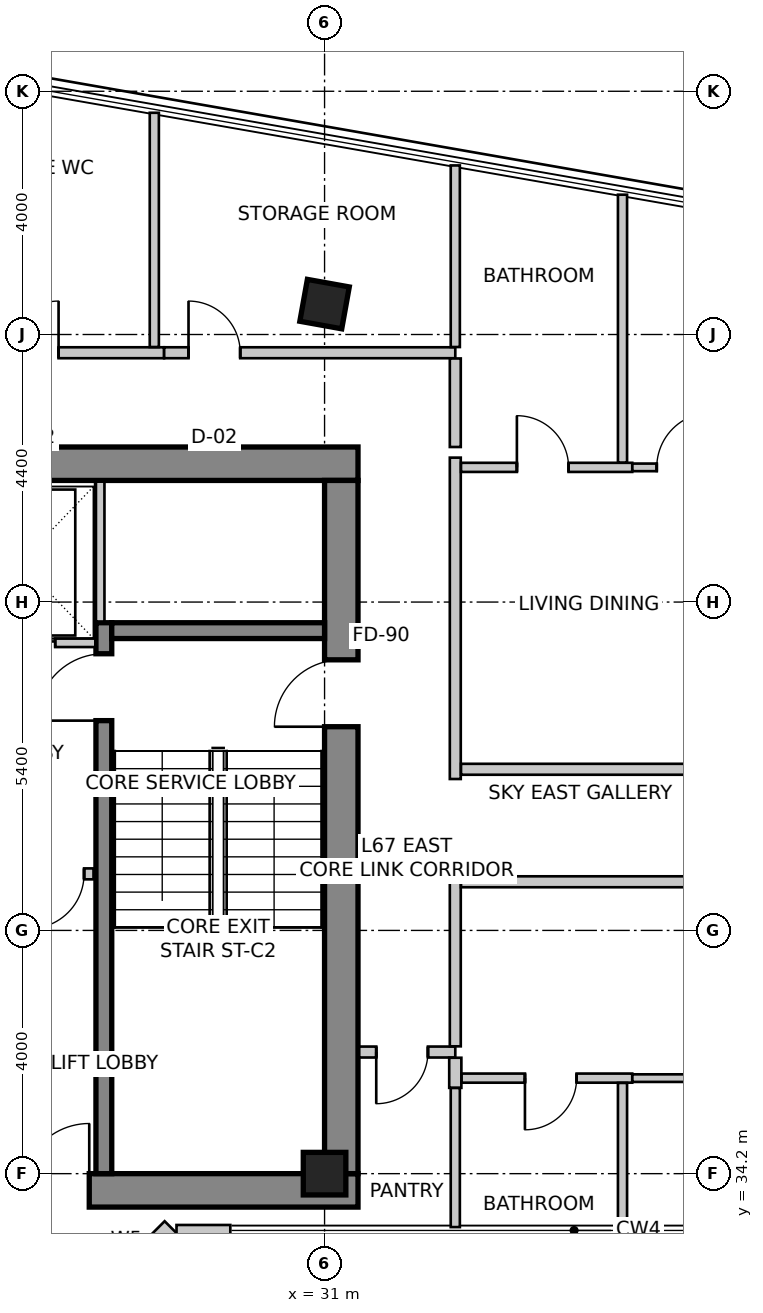
"""IFC4 building model, lengths in metres.
Left out: names, types, materials, properties, quantities, classifications, styles, units other than length and angle.
Written with IfcOpenShell. Run it as: python <this file> out.ifc"""

import sys

from ifc_helpers import new_model, si_unit, direction, frame, frame_2d, origin, origin_2d, place, context, subcontext, project, spatial, rectangle, extrude, source, transform, mapped, element, fill, save


model = new_model("IFC4")
c1 = context("Model", 3, precision=1e-05, world=origin(), true_north=direction((0.0, 1.0)))
c2 = subcontext(c1, "Body", "Model", "MODEL_VIEW")
j1 = project(units=[si_unit("LENGTHUNIT", "METRE"), si_unit("PLANEANGLEUNIT", "RADIAN")], contexts=[c1])
p1 = place(None, origin())
s1 = spatial("IfcSite", under=j1, at=p1, CompositionType="ELEMENT")
p2 = place(p1, origin())
s2 = spatial("IfcBuilding", under=s1, at=p2, CompositionType="ELEMENT")
p3 = place(p2, frame((0.0, 0.0, 263.7)))
s3 = spatial("IfcBuildingStorey", under=s2, at=p3, CompositionType="ELEMENT", Elevation=263.7)
p4 = place(p3, frame((16.05, 45.875, 0.0), z_axis=(0.0, 0.0, 1.0), x_axis=(1.0, 0.0, 0.0)))
e1 = element("IfcWall", 1, at=p4, inside=s3, PredefinedType="SHEAR", context=c2, shape_type="SweptSolid", body=[
    extrude(rectangle(XDim=15.5, YDim=0.55, at=frame_2d((7.75, 0.0))), origin(), (0.0, 0.0, 1.0), 3.6),
])
p5 = place(p3, frame((16.05, 33.925, 0.0), z_axis=(0.0, 0.0, 1.0), x_axis=(1.0, 0.0, 0.0)))
e2 = element("IfcWall", 2, at=p5, inside=s3, PredefinedType="SHEAR", context=c2, shape_type="SweptSolid", body=[
    extrude(rectangle(XDim=15.5, YDim=0.55, at=frame_2d((7.75, 0.0))), origin(), (0.0, 0.0, 1.0), 3.6),
])
m1 = source(origin(), c2, "Body", "SweptSolid", [
    extrude(rectangle(XDim=1.1, YDim=2.15, at=frame_2d((0.55, 1.075))), frame((0.0, 0.285, 0.0), z_axis=(0.0, -1.0, 0.0), x_axis=(1.0, 0.0, 0.0)), (0.0, 0.0, 1.0), 0.57),
])
p6 = place(p5, frame((9.98, 0.0, 0.0)))
e3 = element("IfcOpeningElement", 3, at=p6, cuts=e2, PredefinedType="OPENING", context=c2, shape_type="MappedRepresentation", body=[
    mapped(m1, transform((0.0, 0.0, 0.0), scale=1.0)),
])
p7 = place(p3, frame((31.275, 34.2, 0.0), z_axis=(0.0, 0.0, 1.0), x_axis=(0.0, 1.0, 0.0)))
e4 = element("IfcWall", 4, at=p7, inside=s3, PredefinedType="SHEAR", context=c2, shape_type="SweptSolid", body=[
    extrude(rectangle(XDim=11.4, YDim=0.55, at=frame_2d((5.7, 0.0))), origin(), (0.0, 0.0, 1.0), 3.6),
])
p8 = place(p7, frame((7.35, 0.0, 0.0)))
e5 = element("IfcOpeningElement", 5, at=p8, cuts=e4, PredefinedType="OPENING", context=c2, shape_type="MappedRepresentation", body=[
    mapped(m1, transform((0.0, 0.0, 0.0), scale=1.0)),
])
p9 = place(p3, frame((27.37, 34.2, 0.0), z_axis=(0.0, 0.0, 1.0), x_axis=(0.0, 1.0, 0.0)))
e6 = element("IfcWall", 6, at=p9, inside=s3, PredefinedType="SHEAR", context=c2, shape_type="SweptSolid", body=[
    extrude(rectangle(XDim=9.06, YDim=0.26, at=frame_2d((4.53, 0.0))), origin(), (0.0, 0.0, 1.0), 3.6),
])
m2 = source(origin(), c2, "Body", "SweptSolid", [
    extrude(rectangle(XDim=1.1, YDim=2.15, at=frame_2d((0.55, 1.075))), frame((0.0, 0.14, 0.0), z_axis=(0.0, -1.0, 0.0), x_axis=(1.0, 0.0, 0.0)), (0.0, 0.0, 1.0), 0.28),
])
p10 = place(p9, frame((7.45, 0.0, 0.0)))
e7 = element("IfcOpeningElement", 7, at=p10, cuts=e6, PredefinedType="OPENING", context=c2, shape_type="MappedRepresentation", body=[
    mapped(m2, transform((0.0, 0.0, 0.0), scale=1.0)),
])
p11 = place(p3, frame((27.5, 43.13, 0.0), z_axis=(0.0, 0.0, 1.0), x_axis=(1.0, 0.0, 0.0)))
e8 = element("IfcWall", 8, at=p11, inside=s3, PredefinedType="SHEAR", context=c2, shape_type="SweptSolid", body=[
    extrude(rectangle(XDim=3.5, YDim=0.26, at=frame_2d((1.75, 0.0))), origin(), (0.0, 0.0, 1.0), 3.6),
])
m3 = source(origin(), c2, "Body", "SweptSolid", [
    extrude(rectangle(XDim=0.7, YDim=0.7, at=origin_2d()), origin(), (0.0, 0.0, 1.0), 3.6),
])
for number, where, z_axis, x_axis in (
    (9, (31.0, 48.5, 0.0), (0.0, 0.0, 1.0), (0.984, -0.177, 0.0)),
    (10, (31.0, 34.2, 0.0), (0.0, 0.0, 1.0), (1.0, 0.0, 0.0)),
):
    element("IfcColumn", number, at=place(p3, frame(where, z_axis=z_axis, x_axis=x_axis)), inside=s3, PredefinedType="COLUMN", context=c2, shape_type="MappedRepresentation", body=[
        mapped(m3, transform((0.0, 0.0, 0.0), scale=1.0)),
    ])
p12 = place(p3, frame((26.42, 31.256, 0.0), z_axis=(0.0, 0.0, 1.0), x_axis=(0.707106781187, 0.707106781187, 0.0)))
e11 = element("IfcWall", 11, at=p12, inside=s3, PredefinedType="SOLIDWALL", context=c2, shape_type="SweptSolid", body=[
    extrude(rectangle(XDim=2.907, YDim=0.3, at=frame_2d((1.454, 0.0))), origin(), (0.0, 0.0, 1.0), 3.35),
])
m4 = source(origin(), c2, "Body", "SweptSolid", [
    extrude(rectangle(XDim=1.2, YDim=1.6, at=frame_2d((0.6, 0.8))), frame((0.0, 0.16, 0.0), z_axis=(0.0, -1.0, 0.0), x_axis=(1.0, 0.0, 0.0)), (0.0, 0.0, 1.0), 0.32),
])
p13 = place(p12, frame((1.272, 0.0, 0.85)))
e12 = element("IfcOpeningElement", 12, at=p13, cuts=e11, PredefinedType="OPENING", context=c2, shape_type="MappedRepresentation", body=[
    mapped(m4, transform((0.0, 0.0, 0.0), scale=1.0)),
])
p14 = place(p3, frame((28.565, 33.206, 0.0), z_axis=(0.0, 0.0, 1.0), x_axis=(1.0, 0.0, 0.0)))
e13 = element("IfcWall", 13, at=p14, inside=s3, PredefinedType="SOLIDWALL", context=c2, shape_type="SweptSolid", body=[
    extrude(rectangle(XDim=0.885, YDim=0.3, at=frame_2d((0.442, 0.0))), origin(), (0.0, 0.0, 1.0), 3.35),
])
p15 = place(p3, frame((20.37, 42.93, 0.0), z_axis=(0.0, 0.0, 1.0), x_axis=(1.0, 0.0, 0.0)))
e14 = element("IfcWall", 14, at=p15, inside=s3, PredefinedType="SOLIDWALL", context=c2, shape_type="SweptSolid", body=[
    extrude(rectangle(XDim=6.86, YDim=0.14, at=frame_2d((3.43, 0.0))), origin(), (0.0, 0.0, 1.0), 3.35),
])
m5 = source(origin(), c2, "Body", "SweptSolid", [
    extrude(rectangle(XDim=1.1, YDim=2.15, at=frame_2d((0.55, 1.075))), frame((0.0, 0.08, 0.0), z_axis=(0.0, -1.0, 0.0), x_axis=(1.0, 0.0, 0.0)), (0.0, 0.0, 1.0), 0.16),
])
p16 = place(p15, frame((0.5, 0.0, 0.0)))
e15 = element("IfcOpeningElement", 15, at=p16, cuts=e14, PredefinedType="OPENING", context=c2, shape_type="MappedRepresentation", body=[
    mapped(m5, transform((0.0, 0.0, 0.0), scale=1.0)),
])
p17 = place(p15, frame((2.7, 0.0, 0.0)))
e16 = element("IfcOpeningElement", 16, at=p17, cuts=e14, PredefinedType="OPENING", context=c2, shape_type="MappedRepresentation", body=[
    mapped(m5, transform((0.0, 0.0, 0.0), scale=1.0)),
])
p18 = place(p15, frame((5.1, 0.0, 0.0)))
e17 = element("IfcOpeningElement", 17, at=p18, cuts=e14, PredefinedType="OPENING", context=c2, shape_type="MappedRepresentation", body=[
    mapped(m5, transform((0.0, 0.0, 0.0), scale=1.0)),
])
p19 = place(p3, frame((27.31, 43.28, 0.0), z_axis=(0.0, 0.0, 1.0), x_axis=(0.0, 1.0, 0.0)))
e18 = element("IfcWall", 18, at=p19, inside=s3, PredefinedType="SOLIDWALL", context=c2, shape_type="SweptSolid", body=[
    extrude(rectangle(XDim=2.3, YDim=0.14, at=frame_2d((1.15, 0.0))), origin(), (0.0, 0.0, 1.0), 3.35),
])
p20 = place(p3, frame((27.2, 39.13, 0.0), z_axis=(0.0, 0.0, 1.0), x_axis=(-1.0, 0.0, 0.0)))
e19 = element("IfcWall", 19, at=p20, inside=s3, PredefinedType="PARTITIONING", context=c2, shape_type="SweptSolid", body=[
    extrude(rectangle(XDim=1.21, YDim=0.18, at=frame_2d((0.605, 0.0))), origin(), (0.0, 0.0, 1.0), 3.35),
])
m6 = source(origin(), c2, "Body", "SweptSolid", [
    extrude(rectangle(XDim=0.9, YDim=2.15, at=frame_2d((0.45, 1.075))), frame((0.0, 0.1, 0.0), z_axis=(0.0, -1.0, 0.0), x_axis=(1.0, 0.0, 0.0)), (0.0, 0.0, 1.0), 0.2),
])
p21 = place(p20, frame((0.155, 0.0, 0.0)))
e20 = element("IfcOpeningElement", 20, at=p21, cuts=e19, PredefinedType="OPENING", context=c2, shape_type="MappedRepresentation", body=[
    mapped(m6, transform((0.0, 0.0, 0.0), scale=1.0)),
])
p22 = place(p3, frame((24.162, 47.7, 0.0), z_axis=(0.0, 0.0, 1.0), x_axis=(1.0, 0.0, 0.0)))
e21 = element("IfcWall", 21, at=p22, inside=s3, PredefinedType="PARTITIONING", context=c2, shape_type="SweptSolid", body=[
    extrude(rectangle(XDim=4.198, YDim=0.18, at=frame_2d((2.099, 0.0))), origin(), (0.0, 0.0, 1.0), 3.35),
])
m7 = source(origin(), c2, "Body", "SweptSolid", [
    extrude(rectangle(XDim=0.85, YDim=2.15, at=frame_2d((0.425, 1.075))), frame((0.0, 0.1, 0.0), z_axis=(0.0, -1.0, 0.0), x_axis=(1.0, 0.0, 0.0)), (0.0, 0.0, 1.0), 0.2),
])
p23 = place(p22, frame((1.613, 0.0, 0.0)))
e22 = element("IfcOpeningElement", 22, at=p23, cuts=e21, PredefinedType="OPENING", context=c2, shape_type="MappedRepresentation", body=[
    mapped(m7, transform((0.0, 0.0, 0.0), scale=1.0)),
])
p24 = place(p3, frame((28.362, 47.7, 0.0), z_axis=(0.0, 0.0, 1.0), x_axis=(1.0, 0.0, 0.0)))
e23 = element("IfcWall", 23, at=p24, inside=s3, PredefinedType="PARTITIONING", context=c2, shape_type="SweptSolid", body=[
    extrude(rectangle(XDim=4.788, YDim=0.18, at=frame_2d((2.394, 0.0))), origin(), (0.0, 0.0, 1.0), 2.879),
])
p25 = place(p24, frame((0.401, 0.0, 0.0)))
e24 = element("IfcOpeningElement", 24, at=p25, cuts=e23, PredefinedType="OPENING", context=c2, shape_type="MappedRepresentation", body=[
    mapped(m7, transform((0.0, 0.0, 0.0), scale=1.0)),
])
p26 = place(p3, frame((33.15, 47.606, 0.0), z_axis=(0.0, 0.0, 1.0), x_axis=(0.0, -1.0, 0.0)))
e25 = element("IfcWall", 25, at=p26, inside=s3, PredefinedType="PARTITIONING", context=c2, shape_type="SweptSolid", body=[
    extrude(rectangle(XDim=1.456, YDim=0.18, at=frame_2d((0.728, 0.0))), origin(), (0.0, 0.0, 1.0), 3.35),
])
p27 = place(p3, frame((33.15, 36.2, 0.0), z_axis=(0.0, 0.0, 1.0), x_axis=(-1.0, 0.0, 0.0)))
e26 = element("IfcWall", 26, at=p27, inside=s3, PredefinedType="PARTITIONING", context=c2, shape_type="SweptSolid", body=[
    extrude(rectangle(XDim=1.58, YDim=0.18, at=frame_2d((0.79, 0.0))), origin(), (0.0, 0.0, 1.0), 3.35),
])
p28 = place(p27, frame((0.45, 0.0, 0.0)))
e27 = element("IfcOpeningElement", 27, at=p28, cuts=e26, PredefinedType="OPENING", context=c2, shape_type="MappedRepresentation", body=[
    mapped(m7, transform((0.0, 0.0, 0.0), scale=1.0)),
])
p29 = place(p3, frame((33.15, 45.975, 0.0), z_axis=(0.0, 0.0, 1.0), x_axis=(0.0, -1.0, 0.0)))
e28 = element("IfcWall", 28, at=p29, inside=s3, PredefinedType="PARTITIONING", context=c2, shape_type="SweptSolid", body=[
    extrude(rectangle(XDim=5.285, YDim=0.18, at=frame_2d((2.643, 0.0))), origin(), (0.0, 0.0, 1.0), 2.879),
])
p30 = place(p3, frame((33.15, 39.16, 0.0), z_axis=(0.0, 0.0, 1.0), x_axis=(0.0, -1.0, 0.0)))
e29 = element("IfcWall", 29, at=p30, inside=s3, PredefinedType="PARTITIONING", context=c2, shape_type="SweptSolid", body=[
    extrude(rectangle(XDim=2.866, YDim=0.18, at=frame_2d((1.433, 0.0))), origin(), (0.0, 0.0, 1.0), 3.35),
])
p31 = place(p3, frame((28.2, 51.646, 0.0), z_axis=(0.0, 0.0, 1.0), x_axis=(0.0, -1.0, 0.0)))
e30 = element("IfcWall", 30, at=p31, inside=s3, PredefinedType="PARTITIONING", context=c2, shape_type="SweptSolid", body=[
    extrude(rectangle(XDim=3.852, YDim=0.15, at=frame_2d((1.926, 0.0))), origin(), (0.0, 0.0, 1.0), 2.642),
])
p32 = place(p3, frame((33.15, 50.78, 0.0), z_axis=(0.0, 0.0, 1.0), x_axis=(0.0, -1.0, 0.0)))
e31 = element("IfcWall", 31, at=p32, inside=s3, PredefinedType="PARTITIONING", context=c2, shape_type="SweptSolid", body=[
    extrude(rectangle(XDim=2.986, YDim=0.15, at=frame_2d((1.493, 0.0))), origin(), (0.0, 0.0, 1.0), 2.642),
])
p33 = place(p3, frame((33.244, 40.85, 0.0), z_axis=(0.0, 0.0, 1.0), x_axis=(1.0, 0.0, 0.0)))
e32 = element("IfcWall", 32, at=p33, inside=s3, PredefinedType="PARTITIONING", context=c2, shape_type="SweptSolid", body=[
    extrude(rectangle(XDim=8.291, YDim=0.18, at=frame_2d((4.146, 0.0))), origin(), (0.0, 0.0, 1.0), 2.979),
])
p34 = place(p33, frame((3.696, 0.0, 0.0)))
e33 = element("IfcOpeningElement", 33, at=p34, cuts=e32, PredefinedType="OPENING", context=c2, shape_type="MappedRepresentation", body=[
    mapped(m6, transform((0.0, 0.0, 0.0), scale=1.0)),
])
p35 = place(p3, frame((41.535, 39.0, 0.0), z_axis=(0.0, 0.0, 1.0), x_axis=(-1.0, 0.0, 0.0)))
e34 = element("IfcWall", 34, at=p35, inside=s3, PredefinedType="PARTITIONING", context=c2, shape_type="SweptSolid", body=[
    extrude(rectangle(XDim=8.291, YDim=0.18, at=frame_2d((4.146, 0.0))), origin(), (0.0, 0.0, 1.0), 2.979),
])
p36 = place(p35, frame((3.696, 0.0, 0.0)))
e35 = element("IfcOpeningElement", 35, at=p36, cuts=e34, PredefinedType="OPENING", context=c2, shape_type="MappedRepresentation", body=[
    mapped(m6, transform((0.0, 0.0, 0.0), scale=1.0)),
])
p37 = place(p3, frame((33.15, 36.106, 0.0), z_axis=(0.0, 0.0, 1.0), x_axis=(0.0, -1.0, 0.0)))
e36 = element("IfcWall", 36, at=p37, inside=s3, PredefinedType="PARTITIONING", context=c2, shape_type="SweptSolid", body=[
    extrude(rectangle(XDim=0.495, YDim=0.2, at=frame_2d((0.248, 0.0))), origin(), (0.0, 0.0, 1.0), 3.35),
])
p38 = place(p3, frame((33.15, 35.609, 0.0), z_axis=(0.0, 0.0, 1.0), x_axis=(0.0, -1.0, 0.0)))
e37 = element("IfcWall", 37, at=p38, inside=s3, PredefinedType="PARTITIONING", context=c2, shape_type="SweptSolid", body=[
    extrude(rectangle(XDim=2.288, YDim=0.15, at=frame_2d((1.144, 0.0))), origin(), (0.0, 0.0, 1.0), 3.35),
])
p39 = place(p3, frame((33.244, 45.815, 0.0), z_axis=(0.0, 0.0, 1.0), x_axis=(1.0, 0.0, 0.0)))
e38 = element("IfcWall", 38, at=p39, inside=s3, PredefinedType="PARTITIONING", context=c2, shape_type="SweptSolid", body=[
    extrude(rectangle(XDim=2.816, YDim=0.15, at=frame_2d((1.408, 0.0))), origin(), (0.0, 0.0, 1.0), 2.879),
])
m8 = source(origin(), c2, "Body", "SweptSolid", [
    extrude(rectangle(XDim=0.85, YDim=2.15, at=frame_2d((0.425, 1.075))), frame((0.0, 0.085, 0.0), z_axis=(0.0, -1.0, 0.0), x_axis=(1.0, 0.0, 0.0)), (0.0, 0.0, 1.0), 0.17),
])
p40 = place(p39, frame((0.919, 0.0, 0.0)))
e39 = element("IfcOpeningElement", 39, at=p40, cuts=e38, PredefinedType="OPENING", context=c2, shape_type="MappedRepresentation", body=[
    mapped(m8, transform((0.0, 0.0, 0.0), scale=1.0)),
])
p41 = place(p3, frame((36.062, 45.815, 0.0), z_axis=(0.0, 0.0, 1.0), x_axis=(1.0, 0.0, 0.0)))
e40 = element("IfcWall", 40, at=p41, inside=s3, PredefinedType="PARTITIONING", context=c2, shape_type="SweptSolid", body=[
    extrude(rectangle(XDim=4.615, YDim=0.125, at=frame_2d((2.308, 0.0))), origin(), (0.0, 0.0, 1.0), 2.979),
])
m9 = source(origin(), c2, "Body", "SweptSolid", [
    extrude(rectangle(XDim=0.9, YDim=2.15, at=frame_2d((0.45, 1.075))), frame((0.0, 0.073, 0.0), z_axis=(0.0, -1.0, 0.0), x_axis=(1.0, 0.0, 0.0)), (0.0, 0.0, 1.0), 0.145),
])
p42 = place(p41, frame((0.401, 0.0, 0.0)))
e41 = element("IfcOpeningElement", 41, at=p42, cuts=e40, PredefinedType="OPENING", context=c2, shape_type="MappedRepresentation", body=[
    mapped(m9, transform((0.0, 0.0, 0.0), scale=1.0)),
])
p43 = place(p3, frame((35.9, 50.299, 0.0), z_axis=(0.0, 0.0, 1.0), x_axis=(0.0, -1.0, 0.0)))
e42 = element("IfcWall", 42, at=p43, inside=s3, PredefinedType="PARTITIONING", context=c2, shape_type="SweptSolid", body=[
    extrude(rectangle(XDim=4.405, YDim=0.15, at=frame_2d((2.203, 0.0))), origin(), (0.0, 0.0, 1.0), 2.642),
])
p44 = place(p3, frame((36.06, 35.771, 0.0), z_axis=(0.0, 0.0, 1.0), x_axis=(-1.0, 0.0, 0.0)))
e43 = element("IfcWall", 43, at=p44, inside=s3, PredefinedType="PARTITIONING", context=c2, shape_type="SweptSolid", body=[
    extrude(rectangle(XDim=2.806, YDim=0.15, at=frame_2d((1.403, 0.0))), origin(), (0.0, 0.0, 1.0), 3.35),
])
p45 = place(p44, frame((0.915, 0.0, 0.0)))
e44 = element("IfcOpeningElement", 44, at=p45, cuts=e43, PredefinedType="OPENING", context=c2, shape_type="MappedRepresentation", body=[
    mapped(m8, transform((0.0, 0.0, 0.0), scale=1.0)),
])
p46 = place(p3, frame((41.469, 35.771, 0.0), z_axis=(0.0, 0.0, 1.0), x_axis=(-1.0, 0.0, 0.0)))
e45 = element("IfcWall", 45, at=p46, inside=s3, PredefinedType="PARTITIONING", context=c2, shape_type="SweptSolid", body=[
    extrude(rectangle(XDim=5.406, YDim=0.125, at=frame_2d((2.703, 0.0))), origin(), (0.0, 0.0, 1.0), 2.979),
])
p47 = place(p46, frame((0.527, 0.0, 0.0)))
e46 = element("IfcOpeningElement", 46, at=p47, cuts=e45, PredefinedType="OPENING", context=c2, shape_type="MappedRepresentation", body=[
    mapped(m9, transform((0.0, 0.0, 0.0), scale=1.0)),
])
p48 = place(p3, frame((35.9, 35.692, 0.0), z_axis=(0.0, 0.0, 1.0), x_axis=(0.0, -1.0, 0.0)))
e47 = element("IfcWall", 47, at=p48, inside=s3, PredefinedType="PARTITIONING", context=c2, shape_type="SweptSolid", body=[
    extrude(rectangle(XDim=2.371, YDim=0.15, at=frame_2d((1.186, 0.0))), origin(), (0.0, 0.0, 1.0), 3.35),
])
m10 = source(origin(), c2, "Body", "SweptSolid", [
    extrude(rectangle(XDim=1.1, YDim=2.15, at=frame_2d((0.55, 1.075))), frame((0.0, 0.025, 0.0), z_axis=(0.0, -1.0, 0.0), x_axis=(1.0, 0.0, 0.0)), (0.0, 0.0, 1.0), 0.05),
])
p49 = place(p18, origin())
e48 = element("IfcDoor", 48, at=p49, inside=s3, OperationType="SLIDING_TO_LEFT", PredefinedType="DOOR", context=c2, shape_type="MappedRepresentation", body=[
    mapped(m10, transform((0.0, 0.0, 0.0), scale=1.0)),
])
fill(e17, e48)
m11 = source(origin(), c2, "Body", "SweptSolid", [
    extrude(rectangle(XDim=1.1, YDim=2.15, at=frame_2d((0.55, 1.075))), frame((0.0, 0.025, 0.0), z_axis=(0.0, -1.0, 0.0), x_axis=(1.0, 0.0, 0.0)), (0.0, 0.0, 1.0), 0.05),
])
p50 = place(p10, origin())
e49 = element("IfcDoor", 49, at=p50, inside=s3, OperationType="SINGLE_SWING_LEFT", PredefinedType="DOOR", context=c2, shape_type="MappedRepresentation", body=[
    mapped(m11, transform((0.0, 0.0, 0.0), scale=1.0)),
])
fill(e7, e49)
p51 = place(p8, origin())
e50 = element("IfcDoor", 50, at=p51, inside=s3, OperationType="SINGLE_SWING_LEFT", PredefinedType="DOOR", context=c2, shape_type="MappedRepresentation", body=[
    mapped(m11, transform((0.0, 0.0, 0.0), scale=1.0)),
])
fill(e5, e50)
p52 = place(p6, origin())
e51 = element("IfcDoor", 51, at=p52, inside=s3, OperationType="SINGLE_SWING_RIGHT", PredefinedType="DOOR", context=c2, shape_type="MappedRepresentation", body=[
    mapped(m11, transform((0.0, 0.0, 0.0), scale=1.0)),
])
fill(e3, e51)
m12 = source(origin(), c2, "Body", "SweptSolid", [
    extrude(rectangle(XDim=0.9, YDim=2.15, at=frame_2d((0.45, 1.075))), frame((0.0, 0.025, 0.0), z_axis=(0.0, -1.0, 0.0), x_axis=(1.0, 0.0, 0.0)), (0.0, 0.0, 1.0), 0.05),
])
p53 = place(p21, origin())
e52 = element("IfcDoor", 52, at=p53, inside=s3, OperationType="SINGLE_SWING_RIGHT", PredefinedType="DOOR", context=c2, shape_type="MappedRepresentation", body=[
    mapped(m12, transform((0.0, 0.0, 0.0), scale=1.0)),
])
fill(e20, e52)
m13 = source(origin(), c2, "Body", "SweptSolid", [
    extrude(rectangle(XDim=0.85, YDim=2.15, at=frame_2d((0.425, 1.075))), frame((0.0, 0.025, 0.0), z_axis=(0.0, -1.0, 0.0), x_axis=(1.0, 0.0, 0.0)), (0.0, 0.0, 1.0), 0.05),
])
p54 = place(p23, origin())
e53 = element("IfcDoor", 53, at=p54, inside=s3, OperationType="SINGLE_SWING_RIGHT", PredefinedType="DOOR", context=c2, shape_type="MappedRepresentation", body=[
    mapped(m13, transform((0.0, 0.0, 0.0), scale=1.0)),
])
fill(e22, e53)
p55 = place(p25, origin())
e54 = element("IfcDoor", 54, at=p55, inside=s3, OperationType="SINGLE_SWING_LEFT", PredefinedType="DOOR", context=c2, shape_type="MappedRepresentation", body=[
    mapped(m13, transform((0.0, 0.0, 0.0), scale=1.0)),
])
fill(e24, e54)
p56 = place(p28, origin())
e55 = element("IfcDoor", 55, at=p56, inside=s3, OperationType="SINGLE_SWING_RIGHT", PredefinedType="DOOR", context=c2, shape_type="MappedRepresentation", body=[
    mapped(m13, transform((0.0, 0.0, 0.0), scale=1.0)),
])
fill(e27, e55)
p57 = place(p40, origin())
e56 = element("IfcDoor", 56, at=p57, inside=s3, OperationType="SINGLE_SWING_LEFT", PredefinedType="DOOR", context=c2, shape_type="MappedRepresentation", body=[
    mapped(m13, transform((0.0, 0.0, 0.0), scale=1.0)),
])
fill(e39, e56)
m14 = source(origin(), c2, "Body", "SweptSolid", [
    extrude(rectangle(XDim=0.9, YDim=2.15, at=frame_2d((0.45, 1.075))), frame((0.0, 0.025, 0.0), z_axis=(0.0, -1.0, 0.0), x_axis=(1.0, 0.0, 0.0)), (0.0, 0.0, 1.0), 0.05),
])
p58 = place(p42, origin())
e57 = element("IfcDoor", 57, at=p58, inside=s3, OperationType="SINGLE_SWING_RIGHT", PredefinedType="DOOR", context=c2, shape_type="MappedRepresentation", body=[
    mapped(m14, transform((0.0, 0.0, 0.0), scale=1.0)),
])
fill(e41, e57)
p59 = place(p45, origin())
e58 = element("IfcDoor", 58, at=p59, inside=s3, OperationType="SINGLE_SWING_RIGHT", PredefinedType="DOOR", context=c2, shape_type="MappedRepresentation", body=[
    mapped(m13, transform((0.0, 0.0, 0.0), scale=1.0)),
])
fill(e44, e58)
save(model, sys.argv[1])
